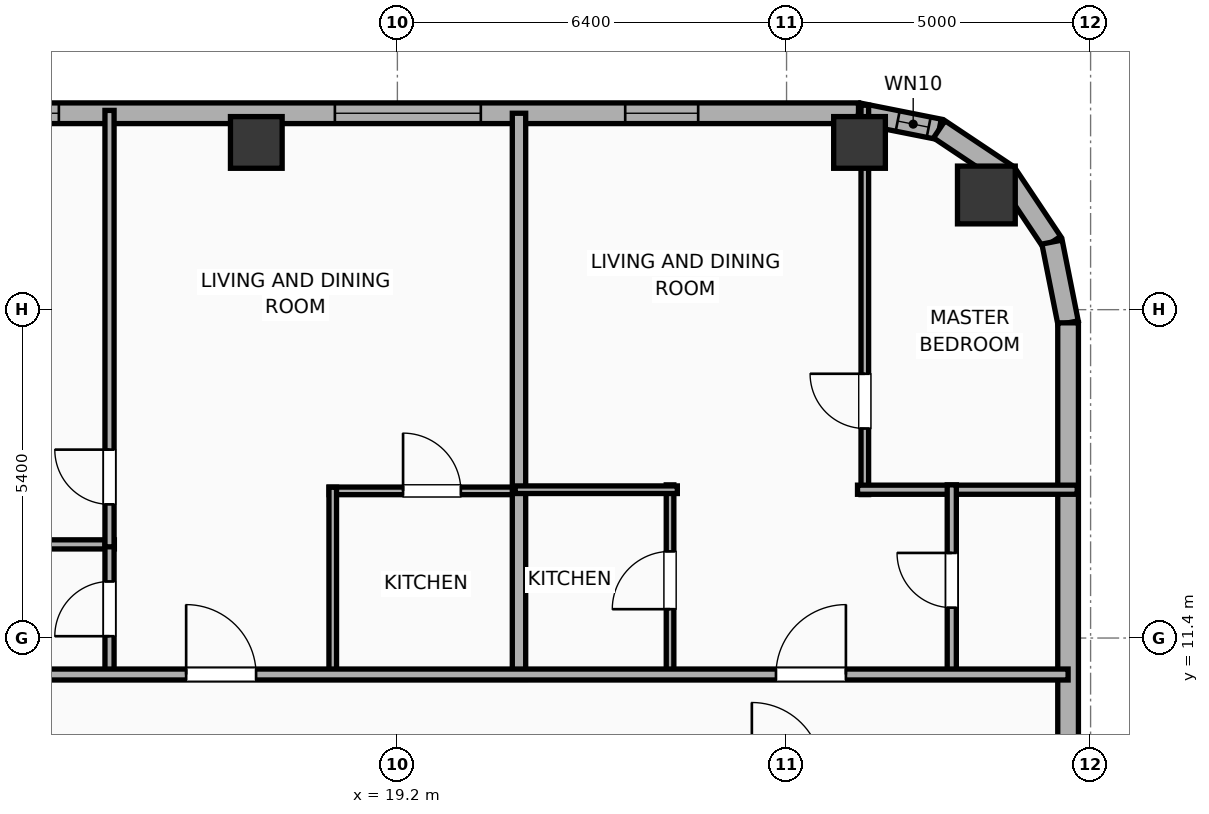
"""IFC4 building model, lengths in metres.
Left out: names, types, materials, properties, quantities, classifications, styles, units other than length and angle.
Written with IfcOpenShell. Run it as: python <this file> out.ifc"""

import sys

from ifc_helpers import new_model, si_unit, direction, frame, frame_2d, origin, origin_2d, place, context, subcontext, project, spatial, rectangle, hollow_rectangle, hollow_circle, extrude, element, fill, save


model = new_model("IFC4")
c1 = context("Model", 3, precision=1e-05, world=origin(), true_north=direction((0.0, 1.0)))
c2 = subcontext(c1, "Body", "Model", "MODEL_VIEW")
j1 = project(units=[si_unit("LENGTHUNIT", "METRE"), si_unit("PLANEANGLEUNIT", "RADIAN")], contexts=[c1])
p1 = place(None, origin())
s1 = spatial("IfcSite", under=j1, at=p1, CompositionType="ELEMENT")
p2 = place(p1, origin())
s2 = spatial("IfcBuilding", under=s1, at=p2, CompositionType="ELEMENT")
p3 = place(p2, frame((0.0, 0.0, 215.8)))
s3 = spatial("IfcBuildingStorey", under=s2, at=p3, CompositionType="ELEMENT", Elevation=215.8)
p4 = place(p3, frame((28.886, 18.686, 0.0), z_axis=(0.0, 0.0, 1.0), x_axis=(1.0, 0.0, 0.0)))
e1 = element("IfcColumn", 1, at=p4, inside=s3, PredefinedType="COLUMN", context=c2, shape_type="SweptSolid", body=[
    extrude(hollow_circle(Radius=0.475, WallThickness=0.032, at=origin_2d()), origin(), (0.0, 0.0, 1.0), 3.9),
])
for number, where, z_axis, x_axis in (
    (2, (26.8, 19.55, 0.0), (0.0, 0.0, 1.0), (1.0, 0.0, 0.0)),
    (3, (16.88, 19.55, 0.0), (0.0, 0.0, 1.0), (1.0, 0.0, 0.0)),
):
    element("IfcColumn", number, at=place(p3, frame(where, z_axis=z_axis, x_axis=x_axis)), inside=s3, PredefinedType="COLUMN", context=c2, shape_type="SweptSolid", body=[
        extrude(hollow_rectangle(XDim=0.85, YDim=0.85, WallThickness=0.028, at=origin_2d()), origin(), (0.0, 0.0, 1.0), 3.9),
    ])
p5 = place(p3, frame((-22.783, 20.03, 0.0), z_axis=(0.0, 0.0, 1.0), x_axis=(1.0, 0.0, 0.0)))
e4 = element("IfcWall", 4, at=p5, inside=s3, PredefinedType="ELEMENTEDWALL", context=c2, shape_type="SweptSolid", body=[
    extrude(rectangle(XDim=49.566, YDim=0.34, at=frame_2d((24.783, 0.0))), origin(), (0.0, 0.0, 1.0), 3.65),
])
p6 = place(p5, frame((40.956, 0.0, 0.75)))
e5 = element("IfcOpeningElement", 5, at=p6, cuts=e4, PredefinedType="OPENING", context=c2, shape_type="SweptSolid", body=[
    extrude(rectangle(XDim=2.4, YDim=2.1, at=frame_2d((1.2, 1.05))), frame((0.0, 0.18, 0.0), z_axis=(0.0, -1.0, 0.0), x_axis=(1.0, 0.0, 0.0)), (0.0, 0.0, 1.0), 0.36),
])
p7 = place(p5, frame((1.437, 0.0, 0.75)))
e6 = element("IfcOpeningElement", 6, at=p7, cuts=e4, PredefinedType="OPENING", context=c2, shape_type="SweptSolid", body=[
    extrude(rectangle(XDim=1.2, YDim=2.05, at=frame_2d((0.6, 1.025))), frame((0.0, 0.18, 0.0), z_axis=(0.0, -1.0, 0.0), x_axis=(1.0, 0.0, 0.0)), (0.0, 0.0, 1.0), 0.36),
])
p8 = place(p5, frame((7.619, 0.0, 0.75)))
e7 = element("IfcOpeningElement", 7, at=p8, cuts=e4, PredefinedType="OPENING", context=c2, shape_type="SweptSolid", body=[
    extrude(rectangle(XDim=1.2, YDim=2.05, at=frame_2d((0.6, 1.025))), frame((0.0, 0.18, 0.0), z_axis=(0.0, -1.0, 0.0), x_axis=(1.0, 0.0, 0.0)), (0.0, 0.0, 1.0), 0.36),
])
p9 = place(p5, frame((4.124, 0.0, 0.75)))
e8 = element("IfcOpeningElement", 8, at=p9, cuts=e4, PredefinedType="OPENING", context=c2, shape_type="SweptSolid", body=[
    extrude(rectangle(XDim=1.2, YDim=2.05, at=frame_2d((0.6, 1.025))), frame((0.0, 0.18, 0.0), z_axis=(0.0, -1.0, 0.0), x_axis=(1.0, 0.0, 0.0)), (0.0, 0.0, 1.0), 0.36),
])
p10 = place(p5, frame((11.278, 0.0, 0.75)))
e9 = element("IfcOpeningElement", 9, at=p10, cuts=e4, PredefinedType="OPENING", context=c2, shape_type="SweptSolid", body=[
    extrude(rectangle(XDim=1.2, YDim=2.05, at=frame_2d((0.6, 1.025))), frame((0.0, 0.18, 0.0), z_axis=(0.0, -1.0, 0.0), x_axis=(1.0, 0.0, 0.0)), (0.0, 0.0, 1.0), 0.36),
])
p11 = place(p5, frame((17.953, 0.0, 0.75)))
e10 = element("IfcOpeningElement", 10, at=p11, cuts=e4, PredefinedType="OPENING", context=c2, shape_type="SweptSolid", body=[
    extrude(rectangle(XDim=1.2, YDim=2.05, at=frame_2d((0.6, 1.025))), frame((0.0, 0.18, 0.0), z_axis=(0.0, -1.0, 0.0), x_axis=(1.0, 0.0, 0.0)), (0.0, 0.0, 1.0), 0.36),
])
p12 = place(p5, frame((14.738, 0.0, 0.75)))
e11 = element("IfcOpeningElement", 11, at=p12, cuts=e4, PredefinedType="OPENING", context=c2, shape_type="SweptSolid", body=[
    extrude(rectangle(XDim=1.2, YDim=2.05, at=frame_2d((0.6, 1.025))), frame((0.0, 0.18, 0.0), z_axis=(0.0, -1.0, 0.0), x_axis=(1.0, 0.0, 0.0)), (0.0, 0.0, 1.0), 0.36),
])
p13 = place(p5, frame((21.878, 0.0, 0.75)))
e12 = element("IfcOpeningElement", 12, at=p13, cuts=e4, PredefinedType="OPENING", context=c2, shape_type="SweptSolid", body=[
    extrude(rectangle(XDim=1.2, YDim=2.05, at=frame_2d((0.6, 1.025))), frame((0.0, 0.18, 0.0), z_axis=(0.0, -1.0, 0.0), x_axis=(1.0, 0.0, 0.0)), (0.0, 0.0, 1.0), 0.36),
])
p14 = place(p5, frame((27.878, 0.0, 0.75)))
e13 = element("IfcOpeningElement", 13, at=p14, cuts=e4, PredefinedType="OPENING", context=c2, shape_type="SweptSolid", body=[
    extrude(rectangle(XDim=1.2, YDim=2.05, at=frame_2d((0.6, 1.025))), frame((0.0, 0.18, 0.0), z_axis=(0.0, -1.0, 0.0), x_axis=(1.0, 0.0, 0.0)), (0.0, 0.0, 1.0), 0.36),
])
p15 = place(p5, frame((24.863, 0.0, 0.75)))
e14 = element("IfcOpeningElement", 14, at=p15, cuts=e4, PredefinedType="OPENING", context=c2, shape_type="SweptSolid", body=[
    extrude(rectangle(XDim=1.2, YDim=2.05, at=frame_2d((0.6, 1.025))), frame((0.0, 0.18, 0.0), z_axis=(0.0, -1.0, 0.0), x_axis=(1.0, 0.0, 0.0)), (0.0, 0.0, 1.0), 0.36),
])
p16 = place(p5, frame((32.078, 0.0, 0.75)))
e15 = element("IfcOpeningElement", 15, at=p16, cuts=e4, PredefinedType="OPENING", context=c2, shape_type="SweptSolid", body=[
    extrude(rectangle(XDim=1.2, YDim=2.05, at=frame_2d((0.6, 1.025))), frame((0.0, 0.18, 0.0), z_axis=(0.0, -1.0, 0.0), x_axis=(1.0, 0.0, 0.0)), (0.0, 0.0, 1.0), 0.36),
])
p17 = place(p5, frame((35.216, 0.0, 0.75)))
e16 = element("IfcOpeningElement", 16, at=p17, cuts=e4, PredefinedType="OPENING", context=c2, shape_type="SweptSolid", body=[
    extrude(rectangle(XDim=1.2, YDim=2.05, at=frame_2d((0.6, 1.025))), frame((0.0, 0.18, 0.0), z_axis=(0.0, -1.0, 0.0), x_axis=(1.0, 0.0, 0.0)), (0.0, 0.0, 1.0), 0.36),
])
p18 = place(p5, frame((45.73, 0.0, 0.75)))
e17 = element("IfcOpeningElement", 17, at=p18, cuts=e4, PredefinedType="OPENING", context=c2, shape_type="SweptSolid", body=[
    extrude(rectangle(XDim=1.2, YDim=2.05, at=frame_2d((0.6, 1.025))), frame((0.0, 0.18, 0.0), z_axis=(0.0, -1.0, 0.0), x_axis=(1.0, 0.0, 0.0)), (0.0, 0.0, 1.0), 0.36),
])
p19 = place(p3, frame((26.783, 20.03, 0.0), z_axis=(0.0, 0.0, 1.0), x_axis=(0.980788153188, -0.195075878998, 0.0)))
e18 = element("IfcWall", 18, at=p19, inside=s3, PredefinedType="ELEMENTEDWALL", context=c2, shape_type="SweptSolid", body=[
    extrude(rectangle(XDim=1.354, YDim=0.34, at=frame_2d((0.677, 0.0))), origin(), (0.0, 0.0, 1.0), 3.65),
])
p20 = place(p19, frame((0.657, 0.0, 0.75)))
e19 = element("IfcOpeningElement", 19, at=p20, cuts=e18, PredefinedType="OPENING", context=c2, shape_type="SweptSolid", body=[
    extrude(rectangle(XDim=0.52, YDim=2.05, at=frame_2d((0.26, 1.025))), frame((0.0, 0.18, 0.0), z_axis=(0.0, -1.0, 0.0), x_axis=(1.0, 0.0, 0.0)), (0.0, 0.0, 1.0), 0.36),
])
for number, where, z_axis, x_axis in (
    (20, (28.111, 19.766, 0.0), (0.0, 0.0, 1.0), (0.831, -0.556, 0.0)),
    (21, (29.223, 19.023, 0.0), (0.0, 0.0, 1.0), (0.556, -0.831, 0.0)),
):
    element("IfcWall", number, at=place(p3, frame(where, z_axis=z_axis, x_axis=x_axis)), inside=s3, PredefinedType="ELEMENTEDWALL", context=c2, shape_type="SweptSolid", body=[
        extrude(rectangle(XDim=1.337, YDim=0.34, at=frame_2d((0.668, 0.0))), origin(), (0.0, 0.0, 1.0), 3.65),
    ])
p21 = place(p3, frame((29.966, 17.911, 0.0), z_axis=(0.0, 0.0, 1.0), x_axis=(0.195075878998, -0.980788153188, 0.0)))
e22 = element("IfcWall", 22, at=p21, inside=s3, PredefinedType="ELEMENTEDWALL", context=c2, shape_type="SweptSolid", body=[
    extrude(rectangle(XDim=1.354, YDim=0.34, at=frame_2d((0.677, 0.0))), origin(), (0.0, 0.0, 1.0), 3.65),
])
p22 = place(p3, frame((30.23, 16.583, 0.0), z_axis=(0.0, 0.0, 1.0), x_axis=(0.0, -1.0, 0.0)))
e23 = element("IfcWall", 23, at=p22, inside=s3, PredefinedType="ELEMENTEDWALL", context=c2, shape_type="SweptSolid", body=[
    extrude(rectangle(XDim=31.967, YDim=0.34, at=frame_2d((15.983, 0.0))), origin(), (0.0, 0.0, 1.0), 3.65),
])
p23 = place(p22, frame((30.132, 0.0, 0.75)))
e24 = element("IfcOpeningElement", 24, at=p23, cuts=e23, PredefinedType="OPENING", context=c2, shape_type="SweptSolid", body=[
    extrude(rectangle(XDim=1.2, YDim=2.05, at=frame_2d((0.6, 1.025))), frame((0.0, 0.18, 0.0), z_axis=(0.0, -1.0, 0.0), x_axis=(1.0, 0.0, 0.0)), (0.0, 0.0, 1.0), 0.36),
])
p24 = place(p22, frame((11.288, 0.0, 0.75)))
e25 = element("IfcOpeningElement", 25, at=p24, cuts=e23, PredefinedType="OPENING", context=c2, shape_type="SweptSolid", body=[
    extrude(rectangle(XDim=1.2, YDim=2.05, at=frame_2d((0.6, 1.025))), frame((0.0, 0.18, 0.0), z_axis=(0.0, -1.0, 0.0), x_axis=(1.0, 0.0, 0.0)), (0.0, 0.0, 1.0), 0.36),
])
p25 = place(p22, frame((20.538, 0.0, 0.75)))
e26 = element("IfcOpeningElement", 26, at=p25, cuts=e23, PredefinedType="OPENING", context=c2, shape_type="SweptSolid", body=[
    extrude(rectangle(XDim=1.2, YDim=2.05, at=frame_2d((0.6, 1.025))), frame((0.0, 0.18, 0.0), z_axis=(0.0, -1.0, 0.0), x_axis=(1.0, 0.0, 0.0)), (0.0, 0.0, 1.0), 0.36),
])
p26 = place(p3, frame((11.34, 12.94, 0.0), z_axis=(0.0, 0.0, 1.0), x_axis=(1.0, 0.0, 0.0)))
e27 = element("IfcWall", 27, at=p26, inside=s3, PredefinedType="PLUMBINGWALL", context=c2, shape_type="SweptSolid", body=[
    extrude(rectangle(XDim=3.206, YDim=0.15, at=frame_2d((1.603, 0.0))), origin(), (0.0, 0.0, 1.0), 3.65),
])
p27 = place(p3, frame((14.466, 10.78, 0.0), z_axis=(0.0, 0.0, 1.0), x_axis=(0.0, 1.0, 0.0)))
e28 = element("IfcWall", 28, at=p27, inside=s3, PredefinedType="PLUMBINGWALL", context=c2, shape_type="SweptSolid", body=[
    extrude(rectangle(XDim=2.2, YDim=0.15, at=frame_2d((1.1, 0.0))), origin(), (0.0, 0.0, 1.0), 3.65),
])
p28 = place(p27, frame((0.65, 0.0, 0.0)))
e29 = element("IfcOpeningElement", 29, at=p28, cuts=e28, PredefinedType="OPENING", context=c2, shape_type="SweptSolid", body=[
    extrude(rectangle(XDim=0.9, YDim=2.05, at=frame_2d((0.45, 1.025))), frame((0.0, 0.085, 0.0), z_axis=(0.0, -1.0, 0.0), x_axis=(1.0, 0.0, 0.0)), (0.0, 0.0, 1.0), 0.17),
])
p29 = place(p3, frame((14.466, 12.9, 0.0), z_axis=(0.0, 0.0, 1.0), x_axis=(0.0, 1.0, 0.0)))
e30 = element("IfcWall", 30, at=p29, inside=s3, PredefinedType="PLUMBINGWALL", context=c2, shape_type="SweptSolid", body=[
    extrude(rectangle(XDim=7.177, YDim=0.15, at=frame_2d((3.588, 0.0))), origin(), (0.0, 0.0, 1.0), 3.65),
])
p30 = place(p29, frame((0.698, 0.0, 0.0)))
e31 = element("IfcOpeningElement", 31, at=p30, cuts=e30, PredefinedType="OPENING", context=c2, shape_type="SweptSolid", body=[
    extrude(rectangle(XDim=0.9, YDim=2.05, at=frame_2d((0.45, 1.025))), frame((0.0, 0.085, 0.0), z_axis=(0.0, -1.0, 0.0), x_axis=(1.0, 0.0, 0.0)), (0.0, 0.0, 1.0), 0.17),
])
p31 = place(p3, frame((18.077, 13.82, 0.0), z_axis=(0.0, 0.0, 1.0), x_axis=(1.0, 0.0, 0.0)))
e32 = element("IfcWall", 32, at=p31, inside=s3, PredefinedType="PARTITIONING", context=c2, shape_type="SweptSolid", body=[
    extrude(rectangle(XDim=3.186, YDim=0.125, at=frame_2d((1.593, 0.0))), origin(), (0.0, 0.0, 1.0), 3.65),
])
p32 = place(p31, frame((1.217, 0.0, 0.0)))
e33 = element("IfcOpeningElement", 33, at=p32, cuts=e32, PredefinedType="OPENING", context=c2, shape_type="SweptSolid", body=[
    extrude(rectangle(XDim=0.95, YDim=2.05, at=frame_2d((0.475, 1.025))), frame((0.0, 0.073, 0.0), z_axis=(0.0, -1.0, 0.0), x_axis=(1.0, 0.0, 0.0)), (0.0, 0.0, 1.0), 0.145),
])
p33 = place(p3, frame((18.137, 10.78, 0.0), z_axis=(0.0, 0.0, 1.0), x_axis=(0.0, 1.0, 0.0)))
e34 = element("IfcWall", 34, at=p33, inside=s3, PredefinedType="PARTITIONING", context=c2, shape_type="SweptSolid", body=[
    extrude(rectangle(XDim=3.1, YDim=0.125, at=frame_2d((1.55, 0.0))), origin(), (0.0, 0.0, 1.0), 3.65),
])
p34 = place(p3, frame((21.2, 10.72, 0.0), z_axis=(0.0, 0.0, 1.0), x_axis=(0.0, 1.0, 0.0)))
e35 = element("IfcWall", 35, at=p34, inside=s3, PredefinedType="PARTITIONING", context=c2, shape_type="SweptSolid", body=[
    extrude(rectangle(XDim=9.31, YDim=0.22, at=frame_2d((4.655, 0.0))), origin(), (0.0, 0.0, 1.0), 3.65),
])
p35 = place(p3, frame((26.887, 13.759, 0.0), z_axis=(0.0, 0.0, 1.0), x_axis=(0.0, 1.0, 0.0)))
e36 = element("IfcWall", 36, at=p35, inside=s3, PredefinedType="PARTITIONING", context=c2, shape_type="SweptSolid", body=[
    extrude(rectangle(XDim=6.403, YDim=0.125, at=frame_2d((3.202, 0.0))), origin(), (0.0, 0.0, 1.0), 3.65),
])
p36 = place(p35, frame((1.087, 0.0, 0.0)))
e37 = element("IfcOpeningElement", 37, at=p36, cuts=e36, PredefinedType="OPENING", context=c2, shape_type="SweptSolid", body=[
    extrude(rectangle(XDim=0.9, YDim=2.05, at=frame_2d((0.45, 1.025))), frame((0.0, 0.073, 0.0), z_axis=(0.0, -1.0, 0.0), x_axis=(1.0, 0.0, 0.0)), (0.0, 0.0, 1.0), 0.145),
])
p37 = place(p3, frame((26.767, 13.839, 0.0), z_axis=(0.0, 0.0, 1.0), x_axis=(1.0, 0.0, 0.0)))
e38 = element("IfcWall", 38, at=p37, inside=s3, PredefinedType="PLUMBINGWALL", context=c2, shape_type="SweptSolid", body=[
    extrude(rectangle(XDim=3.613, YDim=0.15, at=frame_2d((1.806, 0.0))), origin(), (0.0, 0.0, 1.0), 3.65),
])
p38 = place(p3, frame((23.684, 10.78, 0.0), z_axis=(0.0, 0.0, 1.0), x_axis=(0.0, 1.0, 0.0)))
e39 = element("IfcWall", 39, at=p38, inside=s3, PredefinedType="PARTITIONING", context=c2, shape_type="SweptSolid", body=[
    extrude(rectangle(XDim=3.139, YDim=0.125, at=frame_2d((1.569, 0.0))), origin(), (0.0, 0.0, 1.0), 3.65),
])
p39 = place(p38, frame((1.094, 0.0, 0.0)))
e40 = element("IfcOpeningElement", 40, at=p39, cuts=e39, PredefinedType="OPENING", context=c2, shape_type="SweptSolid", body=[
    extrude(rectangle(XDim=0.95, YDim=2.05, at=frame_2d((0.475, 1.025))), frame((0.0, 0.073, 0.0), z_axis=(0.0, -1.0, 0.0), x_axis=(1.0, 0.0, 0.0)), (0.0, 0.0, 1.0), 0.145),
])
p40 = place(p3, frame((21.137, 13.839, 0.0), z_axis=(0.0, 0.0, 1.0), x_axis=(1.0, 0.0, 0.0)))
e41 = element("IfcWall", 41, at=p40, inside=s3, PredefinedType="PARTITIONING", context=c2, shape_type="SweptSolid", body=[
    extrude(rectangle(XDim=2.667, YDim=0.125, at=frame_2d((1.333, 0.0))), origin(), (0.0, 0.0, 1.0), 3.65),
])
p41 = place(p3, frame((28.317, 10.78, 0.0), z_axis=(0.0, 0.0, 1.0), x_axis=(0.0, 1.0, 0.0)))
e42 = element("IfcWall", 42, at=p41, inside=s3, PredefinedType="PLUMBINGWALL", context=c2, shape_type="SweptSolid", body=[
    extrude(rectangle(XDim=3.139, YDim=0.15, at=frame_2d((1.569, 0.0))), origin(), (0.0, 0.0, 1.0), 3.65),
])
p42 = place(p41, frame((1.119, 0.0, 0.0)))
e43 = element("IfcOpeningElement", 43, at=p42, cuts=e42, PredefinedType="OPENING", context=c2, shape_type="SweptSolid", body=[
    extrude(rectangle(XDim=0.9, YDim=2.05, at=frame_2d((0.45, 1.025))), frame((0.0, 0.085, 0.0), z_axis=(0.0, -1.0, 0.0), x_axis=(1.0, 0.0, 0.0)), (0.0, 0.0, 1.0), 0.17),
])
p43 = place(p3, frame((-26.23, 10.8, 0.0), z_axis=(0.0, 0.0, 1.0), x_axis=(1.0, 0.0, 0.0)))
e44 = element("IfcWall", 44, at=p43, inside=s3, PredefinedType="PARTITIONING", context=c2, shape_type="SweptSolid", body=[
    extrude(rectangle(XDim=56.46, YDim=0.18, at=frame_2d((28.23, 0.0))), origin(), (0.0, 0.0, 1.0), 3.65),
])
p44 = place(p43, frame((2.994, 0.0, 0.0)))
e45 = element("IfcOpeningElement", 45, at=p44, cuts=e44, PredefinedType="OPENING", context=c2, shape_type="SweptSolid", body=[
    extrude(rectangle(XDim=0.9, YDim=2.05, at=frame_2d((0.45, 1.025))), frame((0.0, 0.1, 0.0), z_axis=(0.0, -1.0, 0.0), x_axis=(1.0, 0.0, 0.0)), (0.0, 0.0, 1.0), 0.2),
])
p45 = place(p43, frame((11.745, 0.0, 0.0)))
e46 = element("IfcOpeningElement", 46, at=p45, cuts=e44, PredefinedType="OPENING", context=c2, shape_type="SweptSolid", body=[
    extrude(rectangle(XDim=1.15, YDim=2.05, at=frame_2d((0.575, 1.025))), frame((0.0, 0.1, 0.0), z_axis=(0.0, -1.0, 0.0), x_axis=(1.0, 0.0, 0.0)), (0.0, 0.0, 1.0), 0.2),
])
p46 = place(p43, frame((21.907, 0.0, 0.0)))
e47 = element("IfcOpeningElement", 47, at=p46, cuts=e44, PredefinedType="OPENING", context=c2, shape_type="SweptSolid", body=[
    extrude(rectangle(XDim=1.15, YDim=2.05, at=frame_2d((0.575, 1.025))), frame((0.0, 0.1, 0.0), z_axis=(0.0, -1.0, 0.0), x_axis=(1.0, 0.0, 0.0)), (0.0, 0.0, 1.0), 0.2),
])
p47 = place(p43, frame((32.516, 0.0, 0.0)))
e48 = element("IfcOpeningElement", 48, at=p47, cuts=e44, PredefinedType="OPENING", context=c2, shape_type="SweptSolid", body=[
    extrude(rectangle(XDim=1.15, YDim=2.05, at=frame_2d((0.575, 1.025))), frame((0.0, 0.1, 0.0), z_axis=(0.0, -1.0, 0.0), x_axis=(1.0, 0.0, 0.0)), (0.0, 0.0, 1.0), 0.2),
])
p48 = place(p43, frame((41.956, 0.0, 0.0)))
e49 = element("IfcOpeningElement", 49, at=p48, cuts=e44, PredefinedType="OPENING", context=c2, shape_type="SweptSolid", body=[
    extrude(rectangle(XDim=1.15, YDim=2.05, at=frame_2d((0.575, 1.025))), frame((0.0, 0.1, 0.0), z_axis=(0.0, -1.0, 0.0), x_axis=(1.0, 0.0, 0.0)), (0.0, 0.0, 1.0), 0.2),
])
p49 = place(p43, frame((51.656, 0.0, 0.0)))
e50 = element("IfcOpeningElement", 50, at=p49, cuts=e44, PredefinedType="OPENING", context=c2, shape_type="SweptSolid", body=[
    extrude(rectangle(XDim=1.15, YDim=2.05, at=frame_2d((0.575, 1.025))), frame((0.0, 0.1, 0.0), z_axis=(0.0, -1.0, 0.0), x_axis=(1.0, 0.0, 0.0)), (0.0, 0.0, 1.0), 0.2),
])
p50 = place(p6, origin())
e51 = element("IfcWindow", 51, at=p50, inside=s3, PartitioningType="SINGLE_PANEL", PredefinedType="WINDOW", context=c2, shape_type="SweptSolid", body=[
    extrude(rectangle(XDim=2.4, YDim=2.1, at=frame_2d((1.2, 1.05))), frame((0.0, 0.03, 0.0), z_axis=(0.0, -1.0, 0.0), x_axis=(1.0, 0.0, 0.0)), (0.0, 0.0, 1.0), 0.06),
])
fill(e5, e51)
p51 = place(p17, origin())
e52 = element("IfcWindow", 52, at=p51, inside=s3, PartitioningType="SINGLE_PANEL", PredefinedType="WINDOW", context=c2, shape_type="SweptSolid", body=[
    extrude(rectangle(XDim=1.2, YDim=2.05, at=frame_2d((0.6, 1.025))), frame((0.0, 0.03, 0.0), z_axis=(0.0, -1.0, 0.0), x_axis=(1.0, 0.0, 0.0)), (0.0, 0.0, 1.0), 0.06),
])
fill(e16, e52)
p52 = place(p18, origin())
e53 = element("IfcWindow", 53, at=p52, inside=s3, PartitioningType="SINGLE_PANEL", PredefinedType="WINDOW", context=c2, shape_type="SweptSolid", body=[
    extrude(rectangle(XDim=1.2, YDim=2.05, at=frame_2d((0.6, 1.025))), frame((0.0, 0.03, 0.0), z_axis=(0.0, -1.0, 0.0), x_axis=(1.0, 0.0, 0.0)), (0.0, 0.0, 1.0), 0.06),
])
fill(e17, e53)
p53 = place(p20, origin())
e54 = element("IfcWindow", 54, at=p53, inside=s3, PartitioningType="SINGLE_PANEL", PredefinedType="WINDOW", context=c2, shape_type="SweptSolid", body=[
    extrude(rectangle(XDim=0.52, YDim=2.05, at=frame_2d((0.26, 1.025))), frame((0.0, 0.03, 0.0), z_axis=(0.0, -1.0, 0.0), x_axis=(1.0, 0.0, 0.0)), (0.0, 0.0, 1.0), 0.06),
])
fill(e19, e54)
p54 = place(p28, origin())
e55 = element("IfcDoor", 55, at=p54, inside=s3, OperationType="SINGLE_SWING_LEFT", PredefinedType="DOOR", context=c2, shape_type="SweptSolid", body=[
    extrude(rectangle(XDim=0.9, YDim=2.05, at=frame_2d((0.45, 1.025))), frame((0.0, 0.025, 0.0), z_axis=(0.0, -1.0, 0.0), x_axis=(1.0, 0.0, 0.0)), (0.0, 0.0, 1.0), 0.05),
])
fill(e29, e55)
p55 = place(p30, origin())
e56 = element("IfcDoor", 56, at=p55, inside=s3, OperationType="SINGLE_SWING_RIGHT", PredefinedType="DOOR", context=c2, shape_type="SweptSolid", body=[
    extrude(rectangle(XDim=0.9, YDim=2.05, at=frame_2d((0.45, 1.025))), frame((0.0, 0.025, 0.0), z_axis=(0.0, -1.0, 0.0), x_axis=(1.0, 0.0, 0.0)), (0.0, 0.0, 1.0), 0.05),
])
fill(e31, e56)
p56 = place(p32, origin())
e57 = element("IfcDoor", 57, at=p56, inside=s3, OperationType="SINGLE_SWING_LEFT", PredefinedType="DOOR", context=c2, shape_type="SweptSolid", body=[
    extrude(rectangle(XDim=0.95, YDim=2.05, at=frame_2d((0.475, 1.025))), frame((0.0, 0.025, 0.0), z_axis=(0.0, -1.0, 0.0), x_axis=(1.0, 0.0, 0.0)), (0.0, 0.0, 1.0), 0.05),
])
fill(e33, e57)
p57 = place(p36, origin())
e58 = element("IfcDoor", 58, at=p57, inside=s3, OperationType="SINGLE_SWING_RIGHT", PredefinedType="DOOR", context=c2, shape_type="SweptSolid", body=[
    extrude(rectangle(XDim=0.9, YDim=2.05, at=frame_2d((0.45, 1.025))), frame((0.0, 0.025, 0.0), z_axis=(0.0, -1.0, 0.0), x_axis=(1.0, 0.0, 0.0)), (0.0, 0.0, 1.0), 0.05),
])
fill(e37, e58)
p58 = place(p39, origin())
e59 = element("IfcDoor", 59, at=p58, inside=s3, OperationType="SINGLE_SWING_LEFT", PredefinedType="DOOR", context=c2, shape_type="SweptSolid", body=[
    extrude(rectangle(XDim=0.95, YDim=2.05, at=frame_2d((0.475, 1.025))), frame((0.0, 0.025, 0.0), z_axis=(0.0, -1.0, 0.0), x_axis=(1.0, 0.0, 0.0)), (0.0, 0.0, 1.0), 0.05),
])
fill(e40, e59)
p59 = place(p42, origin())
e60 = element("IfcDoor", 60, at=p59, inside=s3, OperationType="SINGLE_SWING_RIGHT", PredefinedType="DOOR", context=c2, shape_type="SweptSolid", body=[
    extrude(rectangle(XDim=0.9, YDim=2.05, at=frame_2d((0.45, 1.025))), frame((0.0, 0.025, 0.0), z_axis=(0.0, -1.0, 0.0), x_axis=(1.0, 0.0, 0.0)), (0.0, 0.0, 1.0), 0.05),
])
fill(e43, e60)
p60 = place(p48, origin())
e61 = element("IfcDoor", 61, at=p60, inside=s3, OperationType="SINGLE_SWING_LEFT", PredefinedType="DOOR", context=c2, shape_type="SweptSolid", body=[
    extrude(rectangle(XDim=1.15, YDim=2.05, at=frame_2d((0.575, 1.025))), frame((0.0, 0.025, 0.0), z_axis=(0.0, -1.0, 0.0), x_axis=(1.0, 0.0, 0.0)), (0.0, 0.0, 1.0), 0.05),
])
fill(e49, e61)
p61 = place(p49, origin())
e62 = element("IfcDoor", 62, at=p61, inside=s3, OperationType="SINGLE_SWING_RIGHT", PredefinedType="DOOR", context=c2, shape_type="SweptSolid", body=[
    extrude(rectangle(XDim=1.15, YDim=2.05, at=frame_2d((0.575, 1.025))), frame((0.0, 0.025, 0.0), z_axis=(0.0, -1.0, 0.0), x_axis=(1.0, 0.0, 0.0)), (0.0, 0.0, 1.0), 0.05),
])
fill(e50, e62)
save(model, sys.argv[1])
